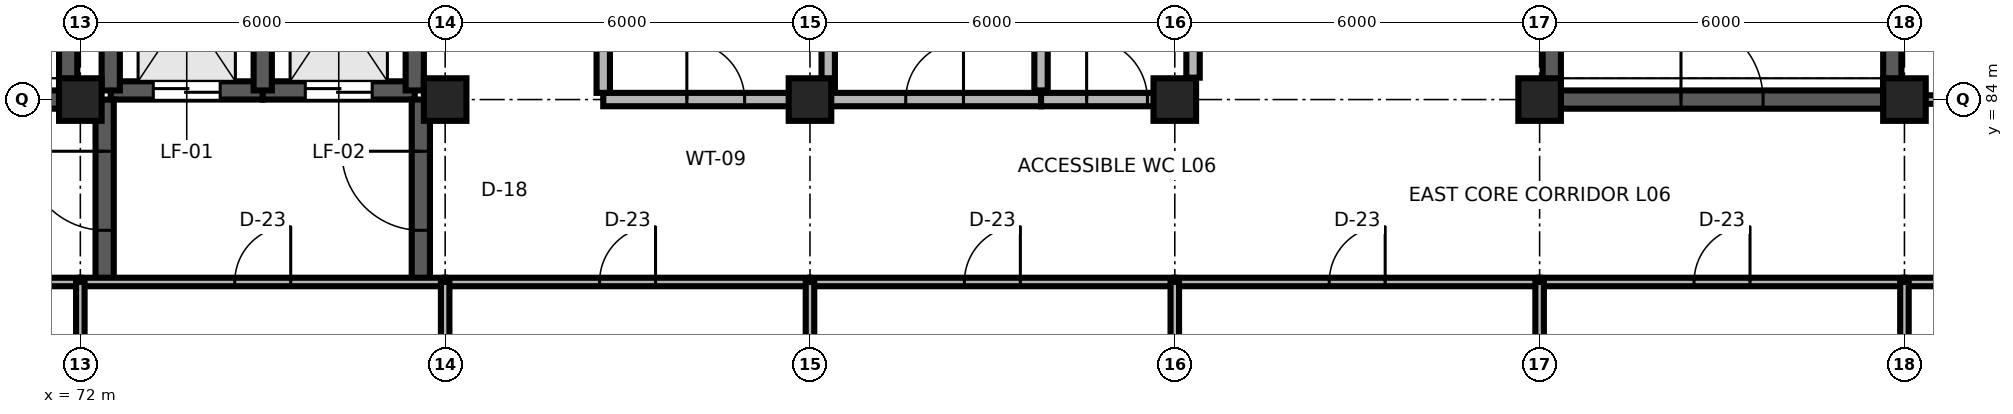
"""IFC4 building model, lengths in metres.
Left out: names, types, materials, properties, quantities, classifications, styles, units other than length and angle.
Written with IfcOpenShell. Run it as: python <this file> out.ifc"""

import sys

from ifc_helpers import new_model, si_unit, direction, frame, frame_2d, origin, origin_2d, place, context, subcontext, project, spatial, rectangle, extrude, element, fill, save


model = new_model("IFC4")
c1 = context("Model", 3, precision=1e-05, world=origin(), true_north=direction((0.0, 1.0)))
c2 = subcontext(c1, "Body", "Model", "MODEL_VIEW")
j1 = project(units=[si_unit("LENGTHUNIT", "METRE"), si_unit("PLANEANGLEUNIT", "RADIAN")], contexts=[c1])
p1 = place(None, origin())
s1 = spatial("IfcSite", under=j1, at=p1, CompositionType="ELEMENT")
p2 = place(p1, origin())
s2 = spatial("IfcBuilding", under=s1, at=p2, CompositionType="ELEMENT")
p3 = place(p2, frame((0.0, 0.0, 24.9)))
s3 = spatial("IfcBuildingStorey", under=s2, at=p3, CompositionType="ELEMENT", Elevation=24.9)
for number, where, z_axis, x_axis in (
    (1, (72.0, 84.0, 0.0), (0.0, 0.0, 1.0), (1.0, 0.0, 0.0)),
    (2, (78.0, 84.0, 0.0), (0.0, 0.0, 1.0), (1.0, 0.0, 0.0)),
    (3, (84.0, 84.0, 0.0), (0.0, 0.0, 1.0), (1.0, 0.0, 0.0)),
    (4, (90.0, 84.0, 0.0), (0.0, 0.0, 1.0), (1.0, 0.0, 0.0)),
    (5, (96.0, 84.0, 0.0), (0.0, 0.0, 1.0), (1.0, 0.0, 0.0)),
    (6, (102.0, 84.0, 0.0), (0.0, 0.0, 1.0), (1.0, 0.0, 0.0)),
):
    element("IfcColumn", number, at=place(p3, frame(where, z_axis=z_axis, x_axis=x_axis)), inside=s3, PredefinedType="COLUMN", context=c2, shape_type="SweptSolid", body=[
        extrude(rectangle(XDim=0.7, YDim=0.7, at=origin_2d()), origin(), (0.0, 0.0, 1.0), 3.9),
    ])
p4 = place(p3, frame((66.35, 84.0, 0.0), z_axis=(0.0, 0.0, 1.0), x_axis=(1.0, 0.0, 0.0)))
e7 = element("IfcWall", 7, at=p4, inside=s3, PredefinedType="SHEAR", context=c2, shape_type="SweptSolid", body=[
    extrude(rectangle(XDim=5.3, YDim=0.3, at=frame_2d((2.65, 0.0))), origin(), (0.0, 0.0, 1.0), 3.66),
])
p5 = place(p4, frame((1.975, 0.0, 0.0)))
e8 = element("IfcOpeningElement", 8, at=p5, cuts=e7, PredefinedType="OPENING", context=c2, shape_type="SweptSolid", body=[
    extrude(rectangle(XDim=1.35, YDim=2.2, at=frame_2d((0.675, 1.1))), frame((0.0, 0.165, 0.0), z_axis=(0.0, -1.0, 0.0), x_axis=(1.0, 0.0, 0.0)), (0.0, 0.0, 1.0), 0.33),
])
p6 = place(p3, frame((71.8, 84.0, 0.0), z_axis=(0.0, 0.0, 1.0), x_axis=(0.0, 1.0, 0.0)))
e9 = element("IfcWall", 9, at=p6, inside=s3, PredefinedType="SHEAR", context=c2, shape_type="SweptSolid", body=[
    extrude(rectangle(XDim=11.8, YDim=0.3, at=frame_2d((5.9, 0.0))), origin(), (0.0, 0.0, 1.0), 3.74),
])
p7 = place(p3, frame((96.35, 84.0, 0.0), z_axis=(0.0, 0.0, 1.0), x_axis=(1.0, 0.0, 0.0)))
e10 = element("IfcWall", 10, at=p7, inside=s3, PredefinedType="SHEAR", context=c2, shape_type="SweptSolid", body=[
    extrude(rectangle(XDim=5.3, YDim=0.3, at=frame_2d((2.65, 0.0))), origin(), (0.0, 0.0, 1.0), 3.66),
])
p8 = place(p7, frame((1.975, 0.0, 0.0)))
e11 = element("IfcOpeningElement", 11, at=p8, cuts=e10, PredefinedType="OPENING", context=c2, shape_type="SweptSolid", body=[
    extrude(rectangle(XDim=1.35, YDim=2.2, at=frame_2d((0.675, 1.1))), frame((0.0, 0.165, 0.0), z_axis=(0.0, -1.0, 0.0), x_axis=(1.0, 0.0, 0.0)), (0.0, 0.0, 1.0), 0.33),
])
for number, where, z_axis, x_axis in (
    (12, (96.2, 84.0, 0.0), (0.0, 0.0, 1.0), (0.0, 1.0, 0.0)),
    (13, (101.8, 84.0, 0.0), (0.0, 0.0, 1.0), (0.0, 1.0, 0.0)),
):
    element("IfcWall", number, at=place(p3, frame(where, z_axis=z_axis, x_axis=x_axis)), inside=s3, PredefinedType="SHEAR", context=c2, shape_type="SweptSolid", body=[
        extrude(rectangle(XDim=11.8, YDim=0.3, at=frame_2d((5.9, 0.0))), origin(), (0.0, 0.0, 1.0), 3.74),
    ])
p9 = place(p3, frame((72.5, 84.15, 0.0), z_axis=(0.0, 0.0, 1.0), x_axis=(1.0, 0.0, 0.0)))
e14 = element("IfcWall", 14, at=p9, inside=s3, PredefinedType="SHEAR", context=c2, shape_type="SweptSolid", body=[
    extrude(rectangle(XDim=2.5, YDim=0.3, at=frame_2d((1.25, 0.0))), origin(), (0.0, 0.0, 1.0), 3.74),
])
p10 = place(p9, frame((0.7, 0.0, 0.0)))
e15 = element("IfcOpeningElement", 15, at=p10, cuts=e14, PredefinedType="OPENING", context=c2, shape_type="SweptSolid", body=[
    extrude(rectangle(XDim=1.1, YDim=2.1, at=frame_2d((0.55, 1.05))), frame((0.0, 0.165, 0.0), z_axis=(0.0, -1.0, 0.0), x_axis=(1.0, 0.0, 0.0)), (0.0, 0.0, 1.0), 0.33),
])
p11 = place(p3, frame((72.5, 84.15, 0.0), z_axis=(0.0, 0.0, 1.0), x_axis=(0.0, 1.0, 0.0)))
e16 = element("IfcWall", 16, at=p11, inside=s3, PredefinedType="SHEAR", context=c2, shape_type="SweptSolid", body=[
    extrude(rectangle(XDim=3.4, YDim=0.3, at=frame_2d((1.7, 0.0))), origin(), (0.0, 0.0, 1.0), 3.74),
])
p12 = place(p3, frame((75.0, 84.15, 0.0), z_axis=(0.0, 0.0, 1.0), x_axis=(1.0, 0.0, 0.0)))
e17 = element("IfcWall", 17, at=p12, inside=s3, PredefinedType="SHEAR", context=c2, shape_type="SweptSolid", body=[
    extrude(rectangle(XDim=2.5, YDim=0.3, at=frame_2d((1.25, 0.0))), origin(), (0.0, 0.0, 1.0), 3.74),
])
p13 = place(p12, frame((0.7, 0.0, 0.0)))
e18 = element("IfcOpeningElement", 18, at=p13, cuts=e17, PredefinedType="OPENING", context=c2, shape_type="SweptSolid", body=[
    extrude(rectangle(XDim=1.1, YDim=2.1, at=frame_2d((0.55, 1.05))), frame((0.0, 0.165, 0.0), z_axis=(0.0, -1.0, 0.0), x_axis=(1.0, 0.0, 0.0)), (0.0, 0.0, 1.0), 0.33),
])
for number, where, z_axis, x_axis in (
    (19, (75.0, 84.15, 0.0), (0.0, 0.0, 1.0), (0.0, 1.0, 0.0)),
    (20, (77.5, 84.15, 0.0), (0.0, 0.0, 1.0), (0.0, 1.0, 0.0)),
):
    element("IfcWall", number, at=place(p3, frame(where, z_axis=z_axis, x_axis=x_axis)), inside=s3, PredefinedType="SHEAR", context=c2, shape_type="SweptSolid", body=[
        extrude(rectangle(XDim=3.4, YDim=0.3, at=frame_2d((1.7, 0.0))), origin(), (0.0, 0.0, 1.0), 3.74),
    ])
p14 = place(p3, frame((72.4, 81.0, 0.0), z_axis=(0.0, 0.0, 1.0), x_axis=(0.0, 1.0, 0.0)))
e21 = element("IfcWall", 21, at=p14, inside=s3, PredefinedType="SHEAR", context=c2, shape_type="SweptSolid", body=[
    extrude(rectangle(XDim=3.0, YDim=0.3, at=frame_2d((1.5, 0.0))), origin(), (0.0, 0.0, 1.0), 3.74),
])
p15 = place(p14, frame((0.85, 0.0, 0.0)))
e22 = element("IfcOpeningElement", 22, at=p15, cuts=e21, PredefinedType="OPENING", context=c2, shape_type="SweptSolid", body=[
    extrude(rectangle(XDim=1.3, YDim=2.2, at=frame_2d((0.65, 1.1))), frame((0.0, 0.165, 0.0), z_axis=(0.0, -1.0, 0.0), x_axis=(1.0, 0.0, 0.0)), (0.0, 0.0, 1.0), 0.33),
])
p16 = place(p3, frame((77.6, 81.0, 0.0), z_axis=(0.0, 0.0, 1.0), x_axis=(0.0, 1.0, 0.0)))
e23 = element("IfcWall", 23, at=p16, inside=s3, PredefinedType="SHEAR", context=c2, shape_type="SweptSolid", body=[
    extrude(rectangle(XDim=3.0, YDim=0.3, at=frame_2d((1.5, 0.0))), origin(), (0.0, 0.0, 1.0), 3.74),
])
p17 = place(p16, frame((0.85, 0.0, 0.0)))
e24 = element("IfcOpeningElement", 24, at=p17, cuts=e23, PredefinedType="OPENING", context=c2, shape_type="SweptSolid", body=[
    extrude(rectangle(XDim=1.3, YDim=2.2, at=frame_2d((0.65, 1.1))), frame((0.0, 0.165, 0.0), z_axis=(0.0, -1.0, 0.0), x_axis=(1.0, 0.0, 0.0)), (0.0, 0.0, 1.0), 0.33),
])
p18 = place(p3, frame((80.6, 84.0, 0.0), z_axis=(0.0, 0.0, 1.0), x_axis=(1.0, 0.0, 0.0)))
e25 = element("IfcWall", 25, at=p18, inside=s3, PredefinedType="PARTITIONING", context=c2, shape_type="SweptSolid", body=[
    extrude(rectangle(XDim=3.7, YDim=0.22, at=frame_2d((1.85, 0.0))), origin(), (0.0, 0.0, 1.0), 3.352),
])
p19 = place(p18, frame((1.375, 0.0, 0.0)))
e26 = element("IfcOpeningElement", 26, at=p19, cuts=e25, PredefinedType="OPENING", context=c2, shape_type="SweptSolid", body=[
    extrude(rectangle(XDim=0.95, YDim=2.15, at=frame_2d((0.475, 1.075))), frame((0.0, 0.125, 0.0), z_axis=(0.0, -1.0, 0.0), x_axis=(1.0, 0.0, 0.0)), (0.0, 0.0, 1.0), 0.25),
])
p20 = place(p3, frame((84.3, 84.0, 0.0), z_axis=(0.0, 0.0, 1.0), x_axis=(1.0, 0.0, 0.0)))
e27 = element("IfcWall", 27, at=p20, inside=s3, PredefinedType="PARTITIONING", context=c2, shape_type="SweptSolid", body=[
    extrude(rectangle(XDim=3.5, YDim=0.22, at=frame_2d((1.75, 0.0))), origin(), (0.0, 0.0, 1.0), 3.352),
])
p21 = place(p20, frame((1.275, 0.0, 0.0)))
e28 = element("IfcOpeningElement", 28, at=p21, cuts=e27, PredefinedType="OPENING", context=c2, shape_type="SweptSolid", body=[
    extrude(rectangle(XDim=0.95, YDim=2.1, at=frame_2d((0.475, 1.05))), frame((0.0, 0.125, 0.0), z_axis=(0.0, -1.0, 0.0), x_axis=(1.0, 0.0, 0.0)), (0.0, 0.0, 1.0), 0.25),
])
p22 = place(p3, frame((87.8, 84.0, 0.0), z_axis=(0.0, 0.0, 1.0), x_axis=(1.0, 0.0, 0.0)))
e29 = element("IfcWall", 29, at=p22, inside=s3, PredefinedType="PARTITIONING", context=c2, shape_type="SweptSolid", body=[
    extrude(rectangle(XDim=2.5, YDim=0.22, at=frame_2d((1.25, 0.0))), origin(), (0.0, 0.0, 1.0), 3.352),
])
p23 = place(p22, frame((0.75, 0.0, 0.0)))
e30 = element("IfcOpeningElement", 30, at=p23, cuts=e29, PredefinedType="OPENING", context=c2, shape_type="SweptSolid", body=[
    extrude(rectangle(XDim=1.0, YDim=2.15, at=frame_2d((0.5, 1.075))), frame((0.0, 0.125, 0.0), z_axis=(0.0, -1.0, 0.0), x_axis=(1.0, 0.0, 0.0)), (0.0, 0.0, 1.0), 0.25),
])
for number, where, z_axis, x_axis in (
    (31, (84.3, 84.15, 0.0), (0.0, 0.0, 1.0), (0.0, 1.0, 0.0)),
    (32, (87.8, 84.15, 0.0), (0.0, 0.0, 1.0), (0.0, 1.0, 0.0)),
):
    element("IfcWall", number, at=place(p3, frame(where, z_axis=z_axis, x_axis=x_axis)), inside=s3, PredefinedType="PARTITIONING", context=c2, shape_type="SweptSolid", body=[
        extrude(rectangle(XDim=5.0, YDim=0.22, at=frame_2d((2.5, 0.0))), origin(), (0.0, 0.0, 1.0), 3.74),
    ])
p24 = place(p3, frame((66.0, 81.0, 0.0), z_axis=(0.0, 0.0, 1.0), x_axis=(1.0, 0.0, 0.0)))
e33 = element("IfcWall", 33, at=p24, inside=s3, PredefinedType="PARTITIONING", context=c2, shape_type="SweptSolid", body=[
    extrude(rectangle(XDim=6.0, YDim=0.14, at=frame_2d((3.0, 0.0))), origin(), (0.0, 0.0, 1.0), 3.74),
])
p25 = place(p24, frame((2.54, 0.0, 0.0)))
e34 = element("IfcOpeningElement", 34, at=p25, cuts=e33, PredefinedType="OPENING", context=c2, shape_type="SweptSolid", body=[
    extrude(rectangle(XDim=0.92, YDim=2.15, at=frame_2d((0.46, 1.075))), frame((0.0, 0.085, 0.0), z_axis=(0.0, -1.0, 0.0), x_axis=(1.0, 0.0, 0.0)), (0.0, 0.0, 1.0), 0.17),
])
p26 = place(p3, frame((72.0, 81.0, 0.0), z_axis=(0.0, 0.0, 1.0), x_axis=(1.0, 0.0, 0.0)))
e35 = element("IfcWall", 35, at=p26, inside=s3, PredefinedType="PARTITIONING", context=c2, shape_type="SweptSolid", body=[
    extrude(rectangle(XDim=6.0, YDim=0.14, at=frame_2d((3.0, 0.0))), origin(), (0.0, 0.0, 1.0), 3.74),
])
p27 = place(p26, frame((2.54, 0.0, 0.0)))
e36 = element("IfcOpeningElement", 36, at=p27, cuts=e35, PredefinedType="OPENING", context=c2, shape_type="SweptSolid", body=[
    extrude(rectangle(XDim=0.92, YDim=2.15, at=frame_2d((0.46, 1.075))), frame((0.0, 0.085, 0.0), z_axis=(0.0, -1.0, 0.0), x_axis=(1.0, 0.0, 0.0)), (0.0, 0.0, 1.0), 0.17),
])
p28 = place(p3, frame((78.0, 81.0, 0.0), z_axis=(0.0, 0.0, 1.0), x_axis=(1.0, 0.0, 0.0)))
e37 = element("IfcWall", 37, at=p28, inside=s3, PredefinedType="PARTITIONING", context=c2, shape_type="SweptSolid", body=[
    extrude(rectangle(XDim=6.0, YDim=0.14, at=frame_2d((3.0, 0.0))), origin(), (0.0, 0.0, 1.0), 3.74),
])
p29 = place(p28, frame((2.54, 0.0, 0.0)))
e38 = element("IfcOpeningElement", 38, at=p29, cuts=e37, PredefinedType="OPENING", context=c2, shape_type="SweptSolid", body=[
    extrude(rectangle(XDim=0.92, YDim=2.15, at=frame_2d((0.46, 1.075))), frame((0.0, 0.085, 0.0), z_axis=(0.0, -1.0, 0.0), x_axis=(1.0, 0.0, 0.0)), (0.0, 0.0, 1.0), 0.17),
])
p30 = place(p3, frame((84.0, 81.0, 0.0), z_axis=(0.0, 0.0, 1.0), x_axis=(1.0, 0.0, 0.0)))
e39 = element("IfcWall", 39, at=p30, inside=s3, PredefinedType="PARTITIONING", context=c2, shape_type="SweptSolid", body=[
    extrude(rectangle(XDim=6.0, YDim=0.14, at=frame_2d((3.0, 0.0))), origin(), (0.0, 0.0, 1.0), 3.74),
])
p31 = place(p30, frame((2.54, 0.0, 0.0)))
e40 = element("IfcOpeningElement", 40, at=p31, cuts=e39, PredefinedType="OPENING", context=c2, shape_type="SweptSolid", body=[
    extrude(rectangle(XDim=0.92, YDim=2.15, at=frame_2d((0.46, 1.075))), frame((0.0, 0.085, 0.0), z_axis=(0.0, -1.0, 0.0), x_axis=(1.0, 0.0, 0.0)), (0.0, 0.0, 1.0), 0.17),
])
p32 = place(p3, frame((90.0, 81.0, 0.0), z_axis=(0.0, 0.0, 1.0), x_axis=(1.0, 0.0, 0.0)))
e41 = element("IfcWall", 41, at=p32, inside=s3, PredefinedType="PARTITIONING", context=c2, shape_type="SweptSolid", body=[
    extrude(rectangle(XDim=6.0, YDim=0.14, at=frame_2d((3.0, 0.0))), origin(), (0.0, 0.0, 1.0), 3.74),
])
p33 = place(p32, frame((2.54, 0.0, 0.0)))
e42 = element("IfcOpeningElement", 42, at=p33, cuts=e41, PredefinedType="OPENING", context=c2, shape_type="SweptSolid", body=[
    extrude(rectangle(XDim=0.92, YDim=2.15, at=frame_2d((0.46, 1.075))), frame((0.0, 0.085, 0.0), z_axis=(0.0, -1.0, 0.0), x_axis=(1.0, 0.0, 0.0)), (0.0, 0.0, 1.0), 0.17),
])
p34 = place(p3, frame((96.0, 81.0, 0.0), z_axis=(0.0, 0.0, 1.0), x_axis=(1.0, 0.0, 0.0)))
e43 = element("IfcWall", 43, at=p34, inside=s3, PredefinedType="PARTITIONING", context=c2, shape_type="SweptSolid", body=[
    extrude(rectangle(XDim=6.0, YDim=0.14, at=frame_2d((3.0, 0.0))), origin(), (0.0, 0.0, 1.0), 3.74),
])
p35 = place(p34, frame((2.54, 0.0, 0.0)))
e44 = element("IfcOpeningElement", 44, at=p35, cuts=e43, PredefinedType="OPENING", context=c2, shape_type="SweptSolid", body=[
    extrude(rectangle(XDim=0.92, YDim=2.15, at=frame_2d((0.46, 1.075))), frame((0.0, 0.085, 0.0), z_axis=(0.0, -1.0, 0.0), x_axis=(1.0, 0.0, 0.0)), (0.0, 0.0, 1.0), 0.17),
])
p36 = place(p3, frame((102.0, 81.0, 0.0), z_axis=(0.0, 0.0, 1.0), x_axis=(1.0, 0.0, 0.0)))
e45 = element("IfcWall", 45, at=p36, inside=s3, PredefinedType="PARTITIONING", context=c2, shape_type="SweptSolid", body=[
    extrude(rectangle(XDim=6.0, YDim=0.14, at=frame_2d((3.0, 0.0))), origin(), (0.0, 0.0, 1.0), 3.74),
])
p37 = place(p36, frame((2.54, 0.0, 0.0)))
e46 = element("IfcOpeningElement", 46, at=p37, cuts=e45, PredefinedType="OPENING", context=c2, shape_type="SweptSolid", body=[
    extrude(rectangle(XDim=0.92, YDim=2.15, at=frame_2d((0.46, 1.075))), frame((0.0, 0.085, 0.0), z_axis=(0.0, -1.0, 0.0), x_axis=(1.0, 0.0, 0.0)), (0.0, 0.0, 1.0), 0.17),
])
p38 = place(p3, frame((102.0, 84.0, 0.0), z_axis=(0.0, 0.0, 1.0), x_axis=(1.0, 0.0, 0.0)))
e47 = element("IfcWall", 47, at=p38, inside=s3, PredefinedType="PARTITIONING", context=c2, shape_type="SweptSolid", body=[
    extrude(rectangle(XDim=6.0, YDim=0.14, at=frame_2d((3.0, 0.0))), origin(), (0.0, 0.0, 1.0), 3.352),
])
p39 = place(p38, frame((2.475, 0.0, 0.0)))
e48 = element("IfcOpeningElement", 48, at=p39, cuts=e47, PredefinedType="OPENING", context=c2, shape_type="SweptSolid", body=[
    extrude(rectangle(XDim=1.05, YDim=2.25, at=frame_2d((0.525, 1.125))), frame((0.0, 0.085, 0.0), z_axis=(0.0, -1.0, 0.0), x_axis=(1.0, 0.0, 0.0)), (0.0, 0.0, 1.0), 0.17),
])
for number, where, z_axis, x_axis in (
    (49, (72.0, 72.65, 0.0), (0.0, 0.0, 1.0), (0.0, 1.0, 0.0)),
    (50, (78.0, 72.65, 0.0), (0.0, 0.0, 1.0), (0.0, 1.0, 0.0)),
    (51, (84.0, 72.65, 0.0), (0.0, 0.0, 1.0), (0.0, 1.0, 0.0)),
    (52, (90.0, 72.65, 0.0), (0.0, 0.0, 1.0), (0.0, 1.0, 0.0)),
    (53, (96.0, 72.65, 0.0), (0.0, 0.0, 1.0), (0.0, 1.0, 0.0)),
    (54, (102.0, 72.65, 0.0), (0.0, 0.0, 1.0), (0.0, 1.0, 0.0)),
):
    element("IfcWall", number, at=place(p3, frame(where, z_axis=z_axis, x_axis=x_axis)), inside=s3, PredefinedType="PARTITIONING", context=c2, shape_type="SweptSolid", body=[
        extrude(rectangle(XDim=8.35, YDim=0.14, at=frame_2d((4.175, 0.0))), origin(), (0.0, 0.0, 1.0), 3.352),
    ])
p40 = place(p3, frame((80.6, 84.11, 0.0), z_axis=(0.0, 0.0, 1.0), x_axis=(0.0, 1.0, 0.0)))
e55 = element("IfcWall", 55, at=p40, inside=s3, PredefinedType="PARTITIONING", context=c2, shape_type="SweptSolid", body=[
    extrude(rectangle(XDim=4.98, YDim=0.22, at=frame_2d((2.49, 0.0))), origin(), (0.0, 0.0, 1.0), 3.74),
])
p41 = place(p3, frame((90.3, 84.36, 0.0), z_axis=(0.0, 0.0, 1.0), x_axis=(0.0, 1.0, 0.0)))
e56 = element("IfcWall", 56, at=p41, inside=s3, PredefinedType="PARTITIONING", context=c2, shape_type="SweptSolid", body=[
    extrude(rectangle(XDim=4.73, YDim=0.22, at=frame_2d((2.365, 0.0))), origin(), (0.0, 0.0, 1.0), 3.74),
])
p42 = place(p8, origin())
e57 = element("IfcDoor", 57, at=p42, inside=s3, OperationType="SINGLE_SWING_LEFT", PredefinedType="DOOR", context=c2, shape_type="SweptSolid", body=[
    extrude(rectangle(XDim=1.35, YDim=2.2, at=frame_2d((0.675, 1.1))), frame((0.0, 0.025, 0.0), z_axis=(0.0, -1.0, 0.0), x_axis=(1.0, 0.0, 0.0)), (0.0, 0.0, 1.0), 0.05),
])
fill(e11, e57)
p43 = place(p10, origin())
e58 = element("IfcDoor", 58, at=p43, inside=s3, OperationType="DOUBLE_DOOR_SLIDING", PredefinedType="DOOR", context=c2, shape_type="SweptSolid", body=[
    extrude(rectangle(XDim=1.1, YDim=2.1, at=frame_2d((0.55, 1.05))), frame((0.0, 0.025, 0.0), z_axis=(0.0, -1.0, 0.0), x_axis=(1.0, 0.0, 0.0)), (0.0, 0.0, 1.0), 0.05),
])
fill(e15, e58)
p44 = place(p13, origin())
e59 = element("IfcDoor", 59, at=p44, inside=s3, OperationType="DOUBLE_DOOR_SLIDING", PredefinedType="DOOR", context=c2, shape_type="SweptSolid", body=[
    extrude(rectangle(XDim=1.1, YDim=2.1, at=frame_2d((0.55, 1.05))), frame((0.0, 0.025, 0.0), z_axis=(0.0, -1.0, 0.0), x_axis=(1.0, 0.0, 0.0)), (0.0, 0.0, 1.0), 0.05),
])
fill(e18, e59)
p45 = place(p15, origin())
e60 = element("IfcDoor", 60, at=p45, inside=s3, OperationType="SINGLE_SWING_RIGHT", PredefinedType="DOOR", context=c2, shape_type="SweptSolid", body=[
    extrude(rectangle(XDim=1.3, YDim=2.2, at=frame_2d((0.65, 1.1))), frame((0.0, 0.025, 0.0), z_axis=(0.0, -1.0, 0.0), x_axis=(1.0, 0.0, 0.0)), (0.0, 0.0, 1.0), 0.05),
])
fill(e22, e60)
p46 = place(p17, origin())
e61 = element("IfcDoor", 61, at=p46, inside=s3, OperationType="SINGLE_SWING_RIGHT", PredefinedType="DOOR", context=c2, shape_type="SweptSolid", body=[
    extrude(rectangle(XDim=1.3, YDim=2.2, at=frame_2d((0.65, 1.1))), frame((0.0, 0.025, 0.0), z_axis=(0.0, -1.0, 0.0), x_axis=(1.0, 0.0, 0.0)), (0.0, 0.0, 1.0), 0.05),
])
fill(e24, e61)
p47 = place(p19, origin())
e62 = element("IfcDoor", 62, at=p47, inside=s3, OperationType="SINGLE_SWING_LEFT", PredefinedType="DOOR", context=c2, shape_type="SweptSolid", body=[
    extrude(rectangle(XDim=0.95, YDim=2.15, at=frame_2d((0.475, 1.075))), frame((0.0, 0.025, 0.0), z_axis=(0.0, -1.0, 0.0), x_axis=(1.0, 0.0, 0.0)), (0.0, 0.0, 1.0), 0.05),
])
fill(e26, e62)
p48 = place(p21, origin())
e63 = element("IfcDoor", 63, at=p48, inside=s3, OperationType="SINGLE_SWING_RIGHT", PredefinedType="DOOR", context=c2, shape_type="SweptSolid", body=[
    extrude(rectangle(XDim=0.95, YDim=2.1, at=frame_2d((0.475, 1.05))), frame((0.0, 0.025, 0.0), z_axis=(0.0, -1.0, 0.0), x_axis=(1.0, 0.0, 0.0)), (0.0, 0.0, 1.0), 0.05),
])
fill(e28, e63)
p49 = place(p23, origin())
e64 = element("IfcDoor", 64, at=p49, inside=s3, OperationType="SINGLE_SWING_LEFT", PredefinedType="DOOR", context=c2, shape_type="SweptSolid", body=[
    extrude(rectangle(XDim=1.0, YDim=2.15, at=frame_2d((0.5, 1.075))), frame((0.0, 0.025, 0.0), z_axis=(0.0, -1.0, 0.0), x_axis=(1.0, 0.0, 0.0)), (0.0, 0.0, 1.0), 0.05),
])
fill(e30, e64)
p50 = place(p27, origin())
e65 = element("IfcDoor", 65, at=p50, inside=s3, OperationType="SINGLE_SWING_RIGHT", PredefinedType="DOOR", context=c2, shape_type="SweptSolid", body=[
    extrude(rectangle(XDim=0.92, YDim=2.15, at=frame_2d((0.46, 1.075))), frame((0.0, 0.025, 0.0), z_axis=(0.0, -1.0, 0.0), x_axis=(1.0, 0.0, 0.0)), (0.0, 0.0, 1.0), 0.05),
])
fill(e36, e65)
p51 = place(p29, origin())
e66 = element("IfcDoor", 66, at=p51, inside=s3, OperationType="SINGLE_SWING_RIGHT", PredefinedType="DOOR", context=c2, shape_type="SweptSolid", body=[
    extrude(rectangle(XDim=0.92, YDim=2.15, at=frame_2d((0.46, 1.075))), frame((0.0, 0.025, 0.0), z_axis=(0.0, -1.0, 0.0), x_axis=(1.0, 0.0, 0.0)), (0.0, 0.0, 1.0), 0.05),
])
fill(e38, e66)
p52 = place(p31, origin())
e67 = element("IfcDoor", 67, at=p52, inside=s3, OperationType="SINGLE_SWING_RIGHT", PredefinedType="DOOR", context=c2, shape_type="SweptSolid", body=[
    extrude(rectangle(XDim=0.92, YDim=2.15, at=frame_2d((0.46, 1.075))), frame((0.0, 0.025, 0.0), z_axis=(0.0, -1.0, 0.0), x_axis=(1.0, 0.0, 0.0)), (0.0, 0.0, 1.0), 0.05),
])
fill(e40, e67)
p53 = place(p33, origin())
e68 = element("IfcDoor", 68, at=p53, inside=s3, OperationType="SINGLE_SWING_RIGHT", PredefinedType="DOOR", context=c2, shape_type="SweptSolid", body=[
    extrude(rectangle(XDim=0.92, YDim=2.15, at=frame_2d((0.46, 1.075))), frame((0.0, 0.025, 0.0), z_axis=(0.0, -1.0, 0.0), x_axis=(1.0, 0.0, 0.0)), (0.0, 0.0, 1.0), 0.05),
])
fill(e42, e68)
p54 = place(p35, origin())
e69 = element("IfcDoor", 69, at=p54, inside=s3, OperationType="SINGLE_SWING_RIGHT", PredefinedType="DOOR", context=c2, shape_type="SweptSolid", body=[
    extrude(rectangle(XDim=0.92, YDim=2.15, at=frame_2d((0.46, 1.075))), frame((0.0, 0.025, 0.0), z_axis=(0.0, -1.0, 0.0), x_axis=(1.0, 0.0, 0.0)), (0.0, 0.0, 1.0), 0.05),
])
fill(e44, e69)
save(model, sys.argv[1])
